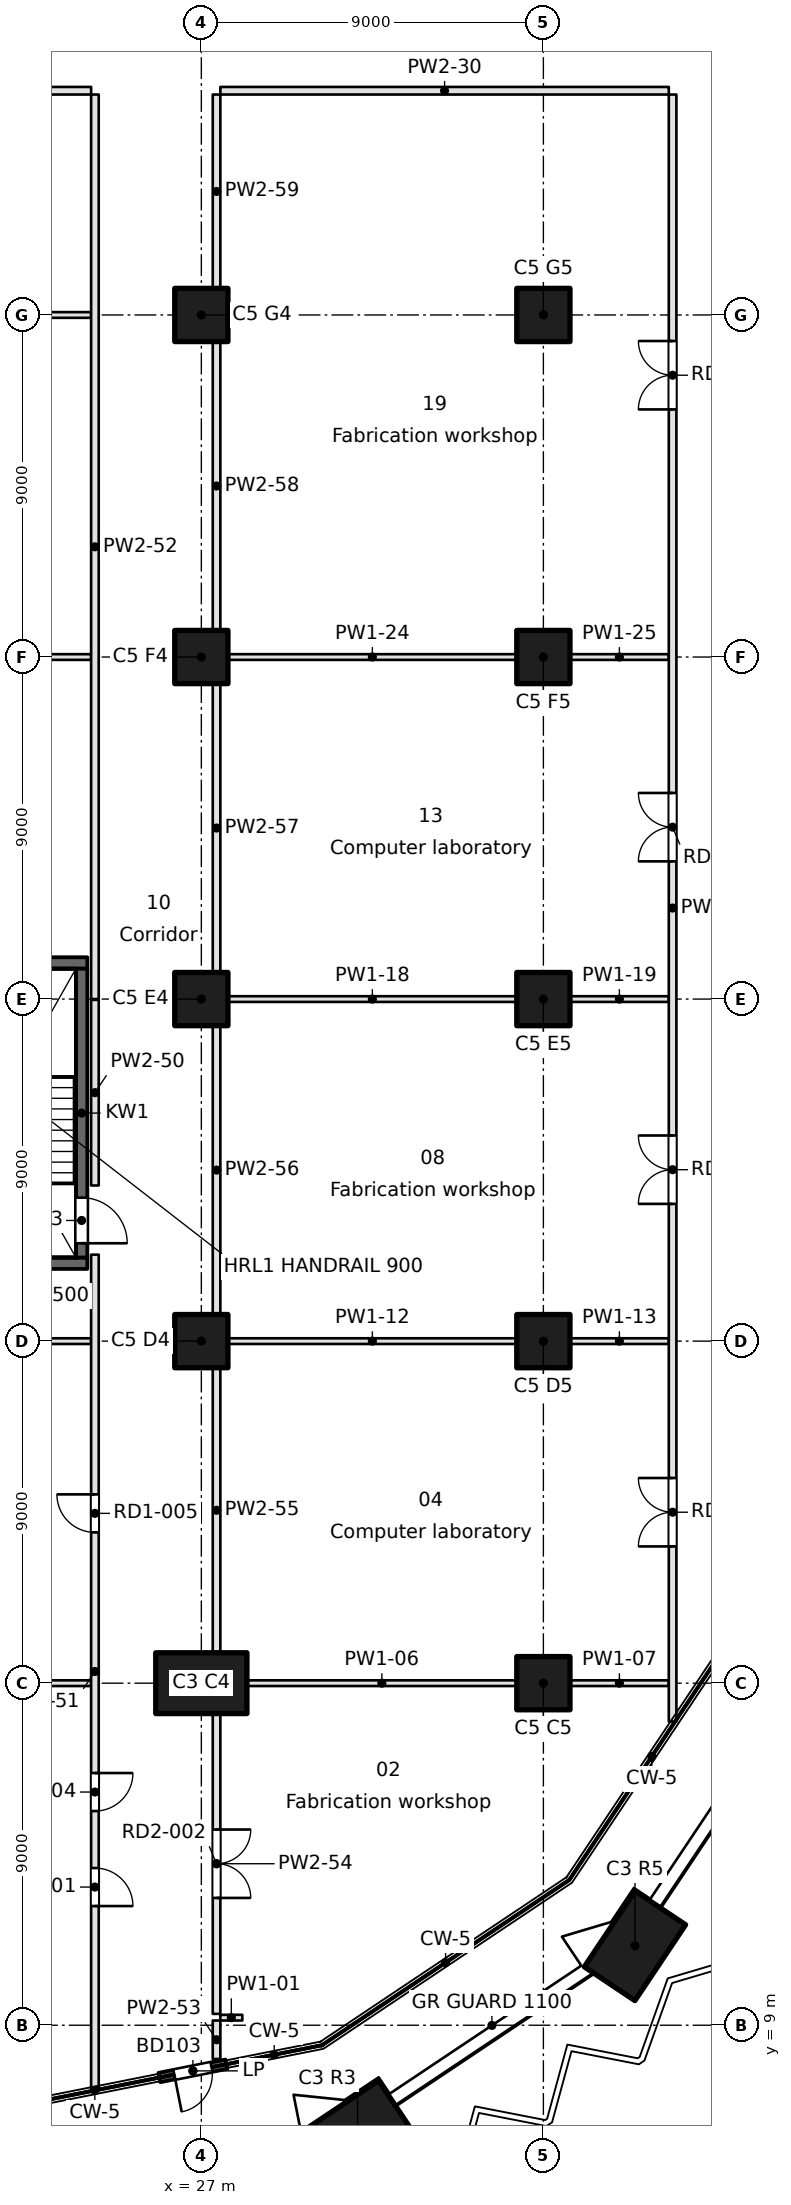
"""IFC4 building model, lengths in metres.
Left out: names, types, materials, properties, quantities, classifications, styles, units other than length and angle.
Written with IfcOpenShell. Run it as: python <this file> out.ifc"""

import sys

from ifc_helpers import new_model, si_unit, direction, frame, frame_2d, origin, origin_2d, place, context, subcontext, project, spatial, rectangle, extrude, element, fill, save


model = new_model("IFC4")
c1 = context("Model", 3, precision=1e-05, world=origin(), true_north=direction((0.0, 1.0)))
c2 = subcontext(c1, "Body", "Model", "MODEL_VIEW")
j1 = project(units=[si_unit("LENGTHUNIT", "METRE"), si_unit("PLANEANGLEUNIT", "RADIAN")], contexts=[c1])
p1 = place(None, origin())
s1 = spatial("IfcSite", under=j1, at=p1, CompositionType="ELEMENT")
p2 = place(p1, origin())
s2 = spatial("IfcBuilding", under=s1, at=p2, CompositionType="ELEMENT")
p3 = place(p2, frame((0.0, 0.0, 76.5)))
s3 = spatial("IfcBuildingStorey", under=s2, at=p3, CompositionType="ELEMENT", Elevation=76.5)
for number, where, z_axis, x_axis in (
    (1, (31.11, 6.213, 0.0), (0.0, 0.0, 1.0), (0.831, 0.556, 0.0)),
    (2, (38.41, 11.09, 0.0), (0.0, 0.0, 1.0), (0.556, 0.831, 0.0)),
    (3, (27.0, 18.0, 0.0), (0.0, 0.0, 1.0), (1.0, 0.0, 0.0)),
):
    element("IfcColumn", number, at=place(p3, frame(where, z_axis=z_axis, x_axis=x_axis)), inside=s3, PredefinedType="COLUMN", context=c2, shape_type="SweptSolid", body=[
        extrude(rectangle(XDim=2.4, YDim=1.6, at=origin_2d()), origin(), (0.0, 0.0, 1.0), 3.7),
    ])
for number, where, z_axis, x_axis in (
    (4, (27.0, 27.0, 0.0), (0.0, 0.0, 1.0), (1.0, 0.0, 0.0)),
    (5, (27.0, 36.0, 0.0), (0.0, 0.0, 1.0), (1.0, 0.0, 0.0)),
    (6, (27.0, 45.0, 0.0), (0.0, 0.0, 1.0), (1.0, 0.0, 0.0)),
    (7, (27.0, 54.0, 0.0), (0.0, 0.0, 1.0), (1.0, 0.0, 0.0)),
    (8, (36.0, 18.0, 0.0), (0.0, 0.0, 1.0), (1.0, 0.0, 0.0)),
    (9, (36.0, 27.0, 0.0), (0.0, 0.0, 1.0), (1.0, 0.0, 0.0)),
    (10, (36.0, 36.0, 0.0), (0.0, 0.0, 1.0), (1.0, 0.0, 0.0)),
    (11, (36.0, 45.0, 0.0), (0.0, 0.0, 1.0), (1.0, 0.0, 0.0)),
    (12, (36.0, 54.0, 0.0), (0.0, 0.0, 1.0), (1.0, 0.0, 0.0)),
):
    element("IfcColumn", number, at=place(p3, frame(where, z_axis=z_axis, x_axis=x_axis)), inside=s3, PredefinedType="COLUMN", context=c2, shape_type="SweptSolid", body=[
        extrude(rectangle(XDim=1.4, YDim=1.4, at=origin_2d()), origin(), (0.0, 0.0, 1.0), 3.7),
    ])
p4 = place(p3, frame((25.896, 7.624, 0.0), z_axis=(0.0, 0.0, 1.0), x_axis=(0.980793982239, 0.195046569833, 0.0)))
e13 = element("IfcWall", 13, at=p4, inside=s3, PredefinedType="SOLIDWALL", context=c2, shape_type="SweptSolid", body=[
    extrude(rectangle(XDim=1.8, YDim=0.25, at=frame_2d((0.9, 0.0))), origin(), (0.0, 0.0, 1.0), 3.25),
])
p5 = place(p4, frame((0.4, 0.0, 0.0)))
e14 = element("IfcOpeningElement", 14, at=p5, cuts=e13, PredefinedType="OPENING", context=c2, shape_type="SweptSolid", body=[
    extrude(rectangle(XDim=1.0, YDim=2.1, at=frame_2d((0.5, 1.05))), frame((0.0, 0.125, 0.0), z_axis=(0.0, -1.0, 0.0), x_axis=(1.0, 0.0, 0.0)), (0.0, 0.0, 1.0), 0.25),
])
for number, where, z_axis, x_axis in (
    (15, (19.1, 29.05, -0.4), (0.0, 0.0, 1.0), (1.0, 0.0, 0.0)),
    (16, (19.1, 36.95, -0.4), (0.0, 0.0, 1.0), (1.0, 0.0, 0.0)),
):
    element("IfcWall", number, at=place(p3, frame(where, z_axis=z_axis, x_axis=x_axis)), inside=s3, PredefinedType="SOLIDWALL", context=c2, shape_type="SweptSolid", body=[
        extrude(rectangle(XDim=4.9, YDim=0.3, at=frame_2d((2.45, 0.0))), origin(), (0.0, 0.0, 1.0), 3.65),
    ])
p6 = place(p3, frame((23.85, 29.2, -0.4), z_axis=(0.0, 0.0, 1.0), x_axis=(0.0, 1.0, 0.0)))
e17 = element("IfcWall", 17, at=p6, inside=s3, PredefinedType="SOLIDWALL", context=c2, shape_type="SweptSolid", body=[
    extrude(rectangle(XDim=7.6, YDim=0.3, at=frame_2d((3.8, 0.0))), origin(), (0.0, 0.0, 1.0), 3.65),
])
p7 = place(p6, frame((0.375, 0.0, 0.4)))
e18 = element("IfcOpeningElement", 18, at=p7, cuts=e17, PredefinedType="OPENING", context=c2, shape_type="SweptSolid", body=[
    extrude(rectangle(XDim=1.2, YDim=2.1, at=frame_2d((0.6, 1.05))), frame((0.0, 0.15, 0.0), z_axis=(0.0, -1.0, 0.0), x_axis=(1.0, 0.0, 0.0)), (0.0, 0.0, 1.0), 0.3),
])
p8 = place(p3, frame((27.5, 9.199, 0.0), z_axis=(0.0, 0.0, 1.0), x_axis=(1.0, 0.0, 0.0)))
e19 = element("IfcWall", 19, at=p8, inside=s3, PredefinedType="PARTITIONING", context=c2, shape_type="SweptSolid", body=[
    extrude(rectangle(XDim=0.578, YDim=0.15, at=frame_2d((0.289, 0.0))), origin(), (0.0, 0.0, 1.0), 3.25),
])
p9 = place(p3, frame((18.7, 18.0, 0.0), z_axis=(0.0, 0.0, 1.0), x_axis=(1.0, 0.0, 0.0)))
e20 = element("IfcWall", 20, at=p9, inside=s3, PredefinedType="PARTITIONING", context=c2, shape_type="SweptSolid", body=[
    extrude(rectangle(XDim=5.4, YDim=0.15, at=frame_2d((2.7, 0.0))), origin(), (0.0, 0.0, 1.0), 3.25),
])
p10 = place(p3, frame((28.2, 18.0, 0.0), z_axis=(0.0, 0.0, 1.0), x_axis=(1.0, 0.0, 0.0)))
e21 = element("IfcWall", 21, at=p10, inside=s3, PredefinedType="PARTITIONING", context=c2, shape_type="SweptSolid", body=[
    extrude(rectangle(XDim=7.1, YDim=0.15, at=frame_2d((3.55, 0.0))), origin(), (0.0, 0.0, 1.0), 3.25),
])
p11 = place(p3, frame((36.7, 18.0, 0.0), z_axis=(0.0, 0.0, 1.0), x_axis=(1.0, 0.0, 0.0)))
e22 = element("IfcWall", 22, at=p11, inside=s3, PredefinedType="PARTITIONING", context=c2, shape_type="SweptSolid", body=[
    extrude(rectangle(XDim=2.6, YDim=0.15, at=frame_2d((1.3, 0.0))), origin(), (0.0, 0.0, 1.0), 3.25),
])
p12 = place(p3, frame((18.7, 27.0, 0.0), z_axis=(0.0, 0.0, 1.0), x_axis=(1.0, 0.0, 0.0)))
e23 = element("IfcWall", 23, at=p12, inside=s3, PredefinedType="PARTITIONING", context=c2, shape_type="SweptSolid", body=[
    extrude(rectangle(XDim=5.4, YDim=0.15, at=frame_2d((2.7, 0.0))), origin(), (0.0, 0.0, 1.0), 3.25),
])
p13 = place(p3, frame((27.7, 27.0, 0.0), z_axis=(0.0, 0.0, 1.0), x_axis=(1.0, 0.0, 0.0)))
e24 = element("IfcWall", 24, at=p13, inside=s3, PredefinedType="PARTITIONING", context=c2, shape_type="SweptSolid", body=[
    extrude(rectangle(XDim=7.6, YDim=0.15, at=frame_2d((3.8, 0.0))), origin(), (0.0, 0.0, 1.0), 3.25),
])
p14 = place(p3, frame((36.7, 27.0, 0.0), z_axis=(0.0, 0.0, 1.0), x_axis=(1.0, 0.0, 0.0)))
e25 = element("IfcWall", 25, at=p14, inside=s3, PredefinedType="PARTITIONING", context=c2, shape_type="SweptSolid", body=[
    extrude(rectangle(XDim=2.6, YDim=0.15, at=frame_2d((1.3, 0.0))), origin(), (0.0, 0.0, 1.0), 3.25),
])
p15 = place(p3, frame((27.7, 36.0, 0.0), z_axis=(0.0, 0.0, 1.0), x_axis=(1.0, 0.0, 0.0)))
e26 = element("IfcWall", 26, at=p15, inside=s3, PredefinedType="PARTITIONING", context=c2, shape_type="SweptSolid", body=[
    extrude(rectangle(XDim=7.6, YDim=0.15, at=frame_2d((3.8, 0.0))), origin(), (0.0, 0.0, 1.0), 3.25),
])
p16 = place(p3, frame((36.7, 36.0, 0.0), z_axis=(0.0, 0.0, 1.0), x_axis=(1.0, 0.0, 0.0)))
e27 = element("IfcWall", 27, at=p16, inside=s3, PredefinedType="PARTITIONING", context=c2, shape_type="SweptSolid", body=[
    extrude(rectangle(XDim=2.6, YDim=0.15, at=frame_2d((1.3, 0.0))), origin(), (0.0, 0.0, 1.0), 3.25),
])
p17 = place(p3, frame((18.7, 45.0, 0.0), z_axis=(0.0, 0.0, 1.0), x_axis=(1.0, 0.0, 0.0)))
e28 = element("IfcWall", 28, at=p17, inside=s3, PredefinedType="PARTITIONING", context=c2, shape_type="SweptSolid", body=[
    extrude(rectangle(XDim=5.4, YDim=0.15, at=frame_2d((2.7, 0.0))), origin(), (0.0, 0.0, 1.0), 3.25),
])
p18 = place(p3, frame((27.7, 45.0, 0.0), z_axis=(0.0, 0.0, 1.0), x_axis=(1.0, 0.0, 0.0)))
e29 = element("IfcWall", 29, at=p18, inside=s3, PredefinedType="PARTITIONING", context=c2, shape_type="SweptSolid", body=[
    extrude(rectangle(XDim=7.6, YDim=0.15, at=frame_2d((3.8, 0.0))), origin(), (0.0, 0.0, 1.0), 3.25),
])
p19 = place(p3, frame((36.7, 45.0, 0.0), z_axis=(0.0, 0.0, 1.0), x_axis=(1.0, 0.0, 0.0)))
e30 = element("IfcWall", 30, at=p19, inside=s3, PredefinedType="PARTITIONING", context=c2, shape_type="SweptSolid", body=[
    extrude(rectangle(XDim=2.6, YDim=0.15, at=frame_2d((1.3, 0.0))), origin(), (0.0, 0.0, 1.0), 3.25),
])
p20 = place(p3, frame((18.7, 54.0, 0.0), z_axis=(0.0, 0.0, 1.0), x_axis=(1.0, 0.0, 0.0)))
e31 = element("IfcWall", 31, at=p20, inside=s3, PredefinedType="PARTITIONING", context=c2, shape_type="SweptSolid", body=[
    extrude(rectangle(XDim=5.4, YDim=0.15, at=frame_2d((2.7, 0.0))), origin(), (0.0, 0.0, 1.0), 3.25),
])
p21 = place(p3, frame((24.1, 59.9, 0.0), z_axis=(0.0, 0.0, 1.0), x_axis=(-1.0, 0.0, 0.0)))
e32 = element("IfcWall", 32, at=p21, inside=s3, PredefinedType="PARTITIONING", context=c2, shape_type="SweptSolid", body=[
    extrude(rectangle(XDim=8.2, YDim=0.2, at=frame_2d((4.1, 0.0))), origin(), (0.0, 0.0, 1.0), 3.25),
])
p22 = place(p21, frame((3.6, 0.0, 0.0)))
e33 = element("IfcOpeningElement", 33, at=p22, cuts=e32, PredefinedType="OPENING", context=c2, shape_type="SweptSolid", body=[
    extrude(rectangle(XDim=1.0, YDim=2.1, at=frame_2d((0.5, 1.05))), frame((0.0, 0.1, 0.0), z_axis=(0.0, -1.0, 0.0), x_axis=(1.0, 0.0, 0.0)), (0.0, 0.0, 1.0), 0.2),
])
p23 = place(p3, frame((39.3, 59.9, 0.0), z_axis=(0.0, 0.0, 1.0), x_axis=(-1.0, 0.0, 0.0)))
e34 = element("IfcWall", 34, at=p23, inside=s3, PredefinedType="PARTITIONING", context=c2, shape_type="SweptSolid", body=[
    extrude(rectangle(XDim=11.8, YDim=0.2, at=frame_2d((5.9, 0.0))), origin(), (0.0, 0.0, 1.0), 3.25),
])
p24 = place(p3, frame((24.2, 31.095, 0.0), z_axis=(0.0, 0.0, 1.0), x_axis=(0.0, 1.0, 0.0)))
e35 = element("IfcWall", 35, at=p24, inside=s3, PredefinedType="PARTITIONING", context=c2, shape_type="SweptSolid", body=[
    extrude(rectangle(XDim=4.884, YDim=0.2, at=frame_2d((2.442, 0.0))), origin(), (0.0, 0.0, 1.0), 3.25),
])
p25 = place(p3, frame((24.2, 7.341, 0.0), z_axis=(0.0, 0.0, 1.0), x_axis=(0.0, 1.0, 0.0)))
e36 = element("IfcWall", 36, at=p25, inside=s3, PredefinedType="PARTITIONING", context=c2, shape_type="SweptSolid", body=[
    extrude(rectangle(XDim=21.934, YDim=0.2, at=frame_2d((10.967, 0.0))), origin(), (0.0, 0.0, 1.0), 3.25),
])
p26 = place(p25, frame((4.794, 0.0, 0.0)))
e37 = element("IfcOpeningElement", 37, at=p26, cuts=e36, PredefinedType="OPENING", context=c2, shape_type="SweptSolid", body=[
    extrude(rectangle(XDim=1.0, YDim=2.1, at=frame_2d((0.5, 1.05))), frame((0.0, 0.1, 0.0), z_axis=(0.0, -1.0, 0.0), x_axis=(1.0, 0.0, 0.0)), (0.0, 0.0, 1.0), 0.2),
])
p27 = place(p25, frame((7.294, 0.0, 0.0)))
e38 = element("IfcOpeningElement", 38, at=p27, cuts=e36, PredefinedType="OPENING", context=c2, shape_type="SweptSolid", body=[
    extrude(rectangle(XDim=1.0, YDim=2.1, at=frame_2d((0.5, 1.05))), frame((0.0, 0.1, 0.0), z_axis=(0.0, -1.0, 0.0), x_axis=(1.0, 0.0, 0.0)), (0.0, 0.0, 1.0), 0.2),
])
p28 = place(p25, frame((14.627, 0.0, 0.0)))
e39 = element("IfcOpeningElement", 39, at=p28, cuts=e36, PredefinedType="OPENING", context=c2, shape_type="SweptSolid", body=[
    extrude(rectangle(XDim=1.0, YDim=2.1, at=frame_2d((0.5, 1.05))), frame((0.0, 0.1, 0.0), z_axis=(0.0, -1.0, 0.0), x_axis=(1.0, 0.0, 0.0)), (0.0, 0.0, 1.0), 0.2),
])
p29 = place(p3, frame((24.2, 36.0, 0.0), z_axis=(0.0, 0.0, 1.0), x_axis=(0.0, 1.0, 0.0)))
e40 = element("IfcWall", 40, at=p29, inside=s3, PredefinedType="PARTITIONING", context=c2, shape_type="SweptSolid", body=[
    extrude(rectangle(XDim=23.8, YDim=0.2, at=frame_2d((11.9, 0.0))), origin(), (0.0, 0.0, 1.0), 3.25),
])
p30 = place(p3, frame((27.4, 9.124, 0.0), z_axis=(0.0, 0.0, 1.0), x_axis=(0.0, -1.0, 0.0)))
e41 = element("IfcWall", 41, at=p30, inside=s3, PredefinedType="PARTITIONING", context=c2, shape_type="SweptSolid", body=[
    extrude(rectangle(XDim=1.011, YDim=0.2, at=frame_2d((0.506, 0.0))), origin(), (0.0, 0.0, 1.0), 3.25),
])
p31 = place(p3, frame((27.4, 17.2, 0.0), z_axis=(0.0, 0.0, 1.0), x_axis=(0.0, -1.0, 0.0)))
e42 = element("IfcWall", 42, at=p31, inside=s3, PredefinedType="PARTITIONING", context=c2, shape_type="SweptSolid", body=[
    extrude(rectangle(XDim=7.901, YDim=0.2, at=frame_2d((3.95, 0.0))), origin(), (0.0, 0.0, 1.0), 3.25),
])
p32 = place(p31, frame((3.051, 0.0, 0.0)))
e43 = element("IfcOpeningElement", 43, at=p32, cuts=e42, PredefinedType="OPENING", context=c2, shape_type="SweptSolid", body=[
    extrude(rectangle(XDim=1.8, YDim=2.1, at=frame_2d((0.9, 1.05))), frame((0.0, 0.1, 0.0), z_axis=(0.0, -1.0, 0.0), x_axis=(1.0, 0.0, 0.0)), (0.0, 0.0, 1.0), 0.2),
])
p33 = place(p3, frame((27.4, 26.3, 0.0), z_axis=(0.0, 0.0, 1.0), x_axis=(0.0, -1.0, 0.0)))
e44 = element("IfcWall", 44, at=p33, inside=s3, PredefinedType="PARTITIONING", context=c2, shape_type="SweptSolid", body=[
    extrude(rectangle(XDim=7.5, YDim=0.2, at=frame_2d((3.75, 0.0))), origin(), (0.0, 0.0, 1.0), 3.25),
])
for number, where, z_axis, x_axis in (
    (45, (27.4, 35.3, 0.0), (0.0, 0.0, 1.0), (0.0, -1.0, 0.0)),
    (46, (27.4, 44.3, 0.0), (0.0, 0.0, 1.0), (0.0, -1.0, 0.0)),
    (47, (27.4, 53.3, 0.0), (0.0, 0.0, 1.0), (0.0, -1.0, 0.0)),
):
    element("IfcWall", number, at=place(p3, frame(where, z_axis=z_axis, x_axis=x_axis)), inside=s3, PredefinedType="PARTITIONING", context=c2, shape_type="SweptSolid", body=[
        extrude(rectangle(XDim=7.6, YDim=0.2, at=frame_2d((3.8, 0.0))), origin(), (0.0, 0.0, 1.0), 3.25),
    ])
p34 = place(p3, frame((27.4, 59.8, 0.0), z_axis=(0.0, 0.0, 1.0), x_axis=(0.0, -1.0, 0.0)))
e48 = element("IfcWall", 48, at=p34, inside=s3, PredefinedType="PARTITIONING", context=c2, shape_type="SweptSolid", body=[
    extrude(rectangle(XDim=5.1, YDim=0.2, at=frame_2d((2.55, 0.0))), origin(), (0.0, 0.0, 1.0), 3.25),
])
p35 = place(p3, frame((39.4, 16.991, 0.0), z_axis=(0.0, 0.0, 1.0), x_axis=(0.0, 1.0, 0.0)))
e49 = element("IfcWall", 49, at=p35, inside=s3, PredefinedType="PARTITIONING", context=c2, shape_type="SweptSolid", body=[
    extrude(rectangle(XDim=42.809, YDim=0.2, at=frame_2d((21.405, 0.0))), origin(), (0.0, 0.0, 1.0), 3.25),
])
p36 = place(p35, frame((4.608, 0.0, 0.0)))
e50 = element("IfcOpeningElement", 50, at=p36, cuts=e49, PredefinedType="OPENING", context=c2, shape_type="SweptSolid", body=[
    extrude(rectangle(XDim=1.8, YDim=2.1, at=frame_2d((0.9, 1.05))), frame((0.0, 0.1, 0.0), z_axis=(0.0, -1.0, 0.0), x_axis=(1.0, 0.0, 0.0)), (0.0, 0.0, 1.0), 0.2),
])
p37 = place(p35, frame((13.62, 0.0, 0.0)))
e51 = element("IfcOpeningElement", 51, at=p37, cuts=e49, PredefinedType="OPENING", context=c2, shape_type="SweptSolid", body=[
    extrude(rectangle(XDim=1.8, YDim=2.1, at=frame_2d((0.9, 1.05))), frame((0.0, 0.1, 0.0), z_axis=(0.0, -1.0, 0.0), x_axis=(1.0, 0.0, 0.0)), (0.0, 0.0, 1.0), 0.2),
])
p38 = place(p35, frame((22.633, 0.0, 0.0)))
e52 = element("IfcOpeningElement", 52, at=p38, cuts=e49, PredefinedType="OPENING", context=c2, shape_type="SweptSolid", body=[
    extrude(rectangle(XDim=1.8, YDim=2.1, at=frame_2d((0.9, 1.05))), frame((0.0, 0.1, 0.0), z_axis=(0.0, -1.0, 0.0), x_axis=(1.0, 0.0, 0.0)), (0.0, 0.0, 1.0), 0.2),
])
p39 = place(p35, frame((34.524, 0.0, 0.0)))
e53 = element("IfcOpeningElement", 53, at=p39, cuts=e49, PredefinedType="OPENING", context=c2, shape_type="SweptSolid", body=[
    extrude(rectangle(XDim=1.8, YDim=2.1, at=frame_2d((0.9, 1.05))), frame((0.0, 0.1, 0.0), z_axis=(0.0, -1.0, 0.0), x_axis=(1.0, 0.0, 0.0)), (0.0, 0.0, 1.0), 0.2),
])
p40 = place(p5, frame((1.0, 0.0, 0.0), z_axis=(0.0, 0.0, 1.0), x_axis=(-1.0, 0.0, 0.0)))
e54 = element("IfcDoor", 54, at=p40, inside=s3, OperationType="SINGLE_SWING_RIGHT", PredefinedType="DOOR", context=c2, shape_type="SweptSolid", body=[
    extrude(rectangle(XDim=1.0, YDim=2.1, at=frame_2d((0.5, 1.05))), frame((0.0, 0.025, 0.0), z_axis=(0.0, -1.0, 0.0), x_axis=(1.0, 0.0, 0.0)), (0.0, 0.0, 1.0), 0.05),
])
fill(e14, e54)
p41 = place(p7, frame((1.2, 0.0, 0.0), z_axis=(0.0, 0.0, 1.0), x_axis=(-1.0, 0.0, 0.0)))
e55 = element("IfcDoor", 55, at=p41, inside=s3, OperationType="SINGLE_SWING_RIGHT", PredefinedType="DOOR", context=c2, shape_type="SweptSolid", body=[
    extrude(rectangle(XDim=1.2, YDim=2.1, at=frame_2d((0.6, 1.05))), frame((0.0, 0.025, 0.0), z_axis=(0.0, -1.0, 0.0), x_axis=(1.0, 0.0, 0.0)), (0.0, 0.0, 1.0), 0.05),
])
fill(e18, e55)
p42 = place(p26, frame((1.0, 0.0, 0.0), z_axis=(0.0, 0.0, 1.0), x_axis=(-1.0, 0.0, 0.0)))
e56 = element("IfcDoor", 56, at=p42, inside=s3, OperationType="SINGLE_SWING_RIGHT", PredefinedType="DOOR", context=c2, shape_type="SweptSolid", body=[
    extrude(rectangle(XDim=1.0, YDim=2.1, at=frame_2d((0.5, 1.05))), frame((0.0, 0.025, 0.0), z_axis=(0.0, -1.0, 0.0), x_axis=(1.0, 0.0, 0.0)), (0.0, 0.0, 1.0), 0.05),
])
fill(e37, e56)
p43 = place(p32, origin())
e57 = element("IfcDoor", 57, at=p43, inside=s3, OperationType="DOUBLE_DOOR_SINGLE_SWING", PredefinedType="DOOR", context=c2, shape_type="SweptSolid", body=[
    extrude(rectangle(XDim=1.8, YDim=2.1, at=frame_2d((0.9, 1.05))), frame((0.0, 0.025, 0.0), z_axis=(0.0, -1.0, 0.0), x_axis=(1.0, 0.0, 0.0)), (0.0, 0.0, 1.0), 0.05),
])
fill(e43, e57)
p44 = place(p27, frame((1.0, 0.0, 0.0), z_axis=(0.0, 0.0, 1.0), x_axis=(-1.0, 0.0, 0.0)))
e58 = element("IfcDoor", 58, at=p44, inside=s3, OperationType="SINGLE_SWING_LEFT", PredefinedType="DOOR", context=c2, shape_type="SweptSolid", body=[
    extrude(rectangle(XDim=1.0, YDim=2.1, at=frame_2d((0.5, 1.05))), frame((0.0, 0.025, 0.0), z_axis=(0.0, -1.0, 0.0), x_axis=(1.0, 0.0, 0.0)), (0.0, 0.0, 1.0), 0.05),
])
fill(e38, e58)
p45 = place(p28, origin())
e59 = element("IfcDoor", 59, at=p45, inside=s3, OperationType="SINGLE_SWING_RIGHT", PredefinedType="DOOR", context=c2, shape_type="SweptSolid", body=[
    extrude(rectangle(XDim=1.0, YDim=2.1, at=frame_2d((0.5, 1.05))), frame((0.0, 0.025, 0.0), z_axis=(0.0, -1.0, 0.0), x_axis=(1.0, 0.0, 0.0)), (0.0, 0.0, 1.0), 0.05),
])
fill(e39, e59)
p46 = place(p36, origin())
e60 = element("IfcDoor", 60, at=p46, inside=s3, OperationType="DOUBLE_DOOR_SINGLE_SWING", PredefinedType="DOOR", context=c2, shape_type="SweptSolid", body=[
    extrude(rectangle(XDim=1.8, YDim=2.1, at=frame_2d((0.9, 1.05))), frame((0.0, 0.025, 0.0), z_axis=(0.0, -1.0, 0.0), x_axis=(1.0, 0.0, 0.0)), (0.0, 0.0, 1.0), 0.05),
])
fill(e50, e60)
p47 = place(p37, origin())
e61 = element("IfcDoor", 61, at=p47, inside=s3, OperationType="DOUBLE_DOOR_SINGLE_SWING", PredefinedType="DOOR", context=c2, shape_type="SweptSolid", body=[
    extrude(rectangle(XDim=1.8, YDim=2.1, at=frame_2d((0.9, 1.05))), frame((0.0, 0.025, 0.0), z_axis=(0.0, -1.0, 0.0), x_axis=(1.0, 0.0, 0.0)), (0.0, 0.0, 1.0), 0.05),
])
fill(e51, e61)
p48 = place(p38, origin())
e62 = element("IfcDoor", 62, at=p48, inside=s3, OperationType="DOUBLE_DOOR_SINGLE_SWING", PredefinedType="DOOR", context=c2, shape_type="SweptSolid", body=[
    extrude(rectangle(XDim=1.8, YDim=2.1, at=frame_2d((0.9, 1.05))), frame((0.0, 0.025, 0.0), z_axis=(0.0, -1.0, 0.0), x_axis=(1.0, 0.0, 0.0)), (0.0, 0.0, 1.0), 0.05),
])
fill(e52, e62)
p49 = place(p39, origin())
e63 = element("IfcDoor", 63, at=p49, inside=s3, OperationType="DOUBLE_DOOR_SINGLE_SWING", PredefinedType="DOOR", context=c2, shape_type="SweptSolid", body=[
    extrude(rectangle(XDim=1.8, YDim=2.1, at=frame_2d((0.9, 1.05))), frame((0.0, 0.025, 0.0), z_axis=(0.0, -1.0, 0.0), x_axis=(1.0, 0.0, 0.0)), (0.0, 0.0, 1.0), 0.05),
])
fill(e53, e63)
save(model, sys.argv[1])
